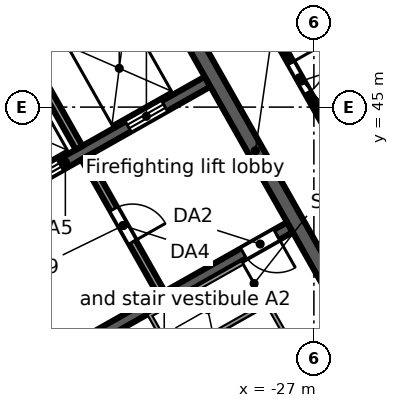
"""IFC4 building model, lengths in metres.
Left out: names, types, materials, properties, quantities, classifications, styles, units other than length and angle.
Written with IfcOpenShell. Run it as: python <this file> out.ifc"""

import sys

from ifc_helpers import new_model, si_unit, direction, frame, frame_2d, origin, place, context, subcontext, project, spatial, rectangle, extrude, element, fill, save


model = new_model("IFC4")
c1 = context("Model", 3, precision=1e-05, world=origin(), true_north=direction((0.0, 1.0)))
c2 = subcontext(c1, "Body", "Model", "MODEL_VIEW")
j1 = project(units=[si_unit("LENGTHUNIT", "METRE"), si_unit("PLANEANGLEUNIT", "RADIAN")], contexts=[c1])
p1 = place(None, origin())
s1 = spatial("IfcSite", under=j1, at=p1, CompositionType="ELEMENT")
p2 = place(p1, origin())
s2 = spatial("IfcBuilding", under=s1, at=p2, CompositionType="ELEMENT")
p3 = place(p2, frame((0.0, 0.0, 274.1)))
s3 = spatial("IfcBuildingStorey", under=s2, at=p3, CompositionType="ELEMENT", Elevation=274.1)
p4 = place(p3, frame((-58.732, 38.771, 0.0), z_axis=(0.0, 0.0, 1.0), x_axis=(0.870355615581, 0.492423702137, 0.0)))
e1 = element("IfcWall", 1, at=p4, inside=s3, PredefinedType="STANDARD", context=c2, shape_type="SweptSolid", body=[
    extrude(rectangle(XDim=64.052, YDim=0.25, at=frame_2d((32.026, 0.0))), origin(), (0.0, 0.0, 1.0), 3.52),
])
p5 = place(p4, frame((61.259, 0.0, 0.8)))
e2 = element("IfcOpeningElement", 2, at=p5, cuts=e1, PredefinedType="OPENING", context=c2, shape_type="SweptSolid", body=[
    extrude(rectangle(XDim=2.4, YDim=2.2, at=frame_2d((1.2, 1.1))), frame((0.0, 0.135, 0.0), z_axis=(0.0, -1.0, 0.0), x_axis=(1.0, 0.0, 0.0)), (0.0, 0.0, 1.0), 0.27),
])
p6 = place(p4, frame((58.216, 0.0, 0.8)))
e3 = element("IfcOpeningElement", 3, at=p6, cuts=e1, PredefinedType="OPENING", context=c2, shape_type="SweptSolid", body=[
    extrude(rectangle(XDim=2.4, YDim=2.2, at=frame_2d((1.2, 1.1))), frame((0.0, 0.135, 0.0), z_axis=(0.0, -1.0, 0.0), x_axis=(1.0, 0.0, 0.0)), (0.0, 0.0, 1.0), 0.27),
])
p7 = place(p4, frame((55.173, 0.0, 0.8)))
e4 = element("IfcOpeningElement", 4, at=p7, cuts=e1, PredefinedType="OPENING", context=c2, shape_type="SweptSolid", body=[
    extrude(rectangle(XDim=2.4, YDim=2.2, at=frame_2d((1.2, 1.1))), frame((0.0, 0.135, 0.0), z_axis=(0.0, -1.0, 0.0), x_axis=(1.0, 0.0, 0.0)), (0.0, 0.0, 1.0), 0.27),
])
p8 = place(p4, frame((52.129, 0.0, 0.8)))
e5 = element("IfcOpeningElement", 5, at=p8, cuts=e1, PredefinedType="OPENING", context=c2, shape_type="SweptSolid", body=[
    extrude(rectangle(XDim=2.4, YDim=2.2, at=frame_2d((1.2, 1.1))), frame((0.0, 0.135, 0.0), z_axis=(0.0, -1.0, 0.0), x_axis=(1.0, 0.0, 0.0)), (0.0, 0.0, 1.0), 0.27),
])
p9 = place(p4, frame((49.086, 0.0, 0.8)))
e6 = element("IfcOpeningElement", 6, at=p9, cuts=e1, PredefinedType="OPENING", context=c2, shape_type="SweptSolid", body=[
    extrude(rectangle(XDim=2.4, YDim=2.2, at=frame_2d((1.2, 1.1))), frame((0.0, 0.135, 0.0), z_axis=(0.0, -1.0, 0.0), x_axis=(1.0, 0.0, 0.0)), (0.0, 0.0, 1.0), 0.27),
])
p10 = place(p4, frame((46.043, 0.0, 0.8)))
e7 = element("IfcOpeningElement", 7, at=p10, cuts=e1, PredefinedType="OPENING", context=c2, shape_type="SweptSolid", body=[
    extrude(rectangle(XDim=2.4, YDim=2.2, at=frame_2d((1.2, 1.1))), frame((0.0, 0.135, 0.0), z_axis=(0.0, -1.0, 0.0), x_axis=(1.0, 0.0, 0.0)), (0.0, 0.0, 1.0), 0.27),
])
p11 = place(p4, frame((43.0, 0.0, 0.8)))
e8 = element("IfcOpeningElement", 8, at=p11, cuts=e1, PredefinedType="OPENING", context=c2, shape_type="SweptSolid", body=[
    extrude(rectangle(XDim=2.4, YDim=2.2, at=frame_2d((1.2, 1.1))), frame((0.0, 0.135, 0.0), z_axis=(0.0, -1.0, 0.0), x_axis=(1.0, 0.0, 0.0)), (0.0, 0.0, 1.0), 0.27),
])
p12 = place(p4, frame((39.956, 0.0, 0.8)))
e9 = element("IfcOpeningElement", 9, at=p12, cuts=e1, PredefinedType="OPENING", context=c2, shape_type="SweptSolid", body=[
    extrude(rectangle(XDim=2.4, YDim=2.2, at=frame_2d((1.2, 1.1))), frame((0.0, 0.135, 0.0), z_axis=(0.0, -1.0, 0.0), x_axis=(1.0, 0.0, 0.0)), (0.0, 0.0, 1.0), 0.27),
])
p13 = place(p4, frame((36.913, 0.0, 0.8)))
e10 = element("IfcOpeningElement", 10, at=p13, cuts=e1, PredefinedType="OPENING", context=c2, shape_type="SweptSolid", body=[
    extrude(rectangle(XDim=2.4, YDim=2.2, at=frame_2d((1.2, 1.1))), frame((0.0, 0.135, 0.0), z_axis=(0.0, -1.0, 0.0), x_axis=(1.0, 0.0, 0.0)), (0.0, 0.0, 1.0), 0.27),
])
p14 = place(p4, frame((33.87, 0.0, 0.8)))
e11 = element("IfcOpeningElement", 11, at=p14, cuts=e1, PredefinedType="OPENING", context=c2, shape_type="SweptSolid", body=[
    extrude(rectangle(XDim=2.4, YDim=2.2, at=frame_2d((1.2, 1.1))), frame((0.0, 0.135, 0.0), z_axis=(0.0, -1.0, 0.0), x_axis=(1.0, 0.0, 0.0)), (0.0, 0.0, 1.0), 0.27),
])
p15 = place(p4, frame((30.826, 0.0, 0.8)))
e12 = element("IfcOpeningElement", 12, at=p15, cuts=e1, PredefinedType="OPENING", context=c2, shape_type="SweptSolid", body=[
    extrude(rectangle(XDim=2.4, YDim=2.2, at=frame_2d((1.2, 1.1))), frame((0.0, 0.135, 0.0), z_axis=(0.0, -1.0, 0.0), x_axis=(1.0, 0.0, 0.0)), (0.0, 0.0, 1.0), 0.27),
])
p16 = place(p4, frame((27.783, 0.0, 0.8)))
e13 = element("IfcOpeningElement", 13, at=p16, cuts=e1, PredefinedType="OPENING", context=c2, shape_type="SweptSolid", body=[
    extrude(rectangle(XDim=2.4, YDim=2.2, at=frame_2d((1.2, 1.1))), frame((0.0, 0.135, 0.0), z_axis=(0.0, -1.0, 0.0), x_axis=(1.0, 0.0, 0.0)), (0.0, 0.0, 1.0), 0.27),
])
p17 = place(p4, frame((24.74, 0.0, 0.8)))
e14 = element("IfcOpeningElement", 14, at=p17, cuts=e1, PredefinedType="OPENING", context=c2, shape_type="SweptSolid", body=[
    extrude(rectangle(XDim=2.4, YDim=2.2, at=frame_2d((1.2, 1.1))), frame((0.0, 0.135, 0.0), z_axis=(0.0, -1.0, 0.0), x_axis=(1.0, 0.0, 0.0)), (0.0, 0.0, 1.0), 0.27),
])
p18 = place(p4, frame((21.696, 0.0, 0.8)))
e15 = element("IfcOpeningElement", 15, at=p18, cuts=e1, PredefinedType="OPENING", context=c2, shape_type="SweptSolid", body=[
    extrude(rectangle(XDim=2.4, YDim=2.2, at=frame_2d((1.2, 1.1))), frame((0.0, 0.135, 0.0), z_axis=(0.0, -1.0, 0.0), x_axis=(1.0, 0.0, 0.0)), (0.0, 0.0, 1.0), 0.27),
])
p19 = place(p4, frame((18.653, 0.0, 0.8)))
e16 = element("IfcOpeningElement", 16, at=p19, cuts=e1, PredefinedType="OPENING", context=c2, shape_type="SweptSolid", body=[
    extrude(rectangle(XDim=2.4, YDim=2.2, at=frame_2d((1.2, 1.1))), frame((0.0, 0.135, 0.0), z_axis=(0.0, -1.0, 0.0), x_axis=(1.0, 0.0, 0.0)), (0.0, 0.0, 1.0), 0.27),
])
p20 = place(p4, frame((15.61, 0.0, 0.8)))
e17 = element("IfcOpeningElement", 17, at=p20, cuts=e1, PredefinedType="OPENING", context=c2, shape_type="SweptSolid", body=[
    extrude(rectangle(XDim=2.4, YDim=2.2, at=frame_2d((1.2, 1.1))), frame((0.0, 0.135, 0.0), z_axis=(0.0, -1.0, 0.0), x_axis=(1.0, 0.0, 0.0)), (0.0, 0.0, 1.0), 0.27),
])
p21 = place(p4, frame((12.567, 0.0, 0.8)))
e18 = element("IfcOpeningElement", 18, at=p21, cuts=e1, PredefinedType="OPENING", context=c2, shape_type="SweptSolid", body=[
    extrude(rectangle(XDim=2.4, YDim=2.2, at=frame_2d((1.2, 1.1))), frame((0.0, 0.135, 0.0), z_axis=(0.0, -1.0, 0.0), x_axis=(1.0, 0.0, 0.0)), (0.0, 0.0, 1.0), 0.27),
])
p22 = place(p4, frame((9.523, 0.0, 0.8)))
e19 = element("IfcOpeningElement", 19, at=p22, cuts=e1, PredefinedType="OPENING", context=c2, shape_type="SweptSolid", body=[
    extrude(rectangle(XDim=2.4, YDim=2.2, at=frame_2d((1.2, 1.1))), frame((0.0, 0.135, 0.0), z_axis=(0.0, -1.0, 0.0), x_axis=(1.0, 0.0, 0.0)), (0.0, 0.0, 1.0), 0.27),
])
p23 = place(p4, frame((6.48, 0.0, 0.8)))
e20 = element("IfcOpeningElement", 20, at=p23, cuts=e1, PredefinedType="OPENING", context=c2, shape_type="SweptSolid", body=[
    extrude(rectangle(XDim=2.4, YDim=2.2, at=frame_2d((1.2, 1.1))), frame((0.0, 0.135, 0.0), z_axis=(0.0, -1.0, 0.0), x_axis=(1.0, 0.0, 0.0)), (0.0, 0.0, 1.0), 0.27),
])
p24 = place(p4, frame((3.437, 0.0, 0.8)))
e21 = element("IfcOpeningElement", 21, at=p24, cuts=e1, PredefinedType="OPENING", context=c2, shape_type="SweptSolid", body=[
    extrude(rectangle(XDim=2.4, YDim=2.2, at=frame_2d((1.2, 1.1))), frame((0.0, 0.135, 0.0), z_axis=(0.0, -1.0, 0.0), x_axis=(1.0, 0.0, 0.0)), (0.0, 0.0, 1.0), 0.27),
])
p25 = place(p4, frame((0.393, 0.0, 0.8)))
e22 = element("IfcOpeningElement", 22, at=p25, cuts=e1, PredefinedType="OPENING", context=c2, shape_type="SweptSolid", body=[
    extrude(rectangle(XDim=2.4, YDim=2.2, at=frame_2d((1.2, 1.1))), frame((0.0, 0.135, 0.0), z_axis=(0.0, -1.0, 0.0), x_axis=(1.0, 0.0, 0.0)), (0.0, 0.0, 1.0), 0.27),
])
p26 = place(p3, frame((-3.017, 46.293, 0.0), z_axis=(0.0, 0.0, 1.0), x_axis=(-0.870355474887, -0.492423950812, 0.0)))
e23 = element("IfcWall", 23, at=p26, inside=s3, PredefinedType="STANDARD", context=c2, shape_type="SweptSolid", body=[
    extrude(rectangle(XDim=40.34, YDim=0.25, at=frame_2d((20.17, 0.0))), origin(), (0.0, 0.0, 1.0), 3.52),
])
p27 = place(p26, frame((37.428, 0.0, 0.8)))
e24 = element("IfcOpeningElement", 24, at=p27, cuts=e23, PredefinedType="OPENING", context=c2, shape_type="SweptSolid", body=[
    extrude(rectangle(XDim=2.4, YDim=2.2, at=frame_2d((1.2, 1.1))), frame((0.0, 0.135, 0.0), z_axis=(0.0, -1.0, 0.0), x_axis=(1.0, 0.0, 0.0)), (0.0, 0.0, 1.0), 0.27),
])
p28 = place(p26, frame((34.372, 0.0, 0.0)))
e25 = element("IfcOpeningElement", 25, at=p28, cuts=e23, PredefinedType="OPENING", context=c2, shape_type="SweptSolid", body=[
    extrude(rectangle(XDim=1.8, YDim=2.4, at=frame_2d((0.9, 1.2))), frame((0.0, 0.135, 0.0), z_axis=(0.0, -1.0, 0.0), x_axis=(1.0, 0.0, 0.0)), (0.0, 0.0, 1.0), 0.27),
])
p29 = place(p26, frame((30.716, 0.0, 0.8)))
e26 = element("IfcOpeningElement", 26, at=p29, cuts=e23, PredefinedType="OPENING", context=c2, shape_type="SweptSolid", body=[
    extrude(rectangle(XDim=2.4, YDim=2.2, at=frame_2d((1.2, 1.1))), frame((0.0, 0.135, 0.0), z_axis=(0.0, -1.0, 0.0), x_axis=(1.0, 0.0, 0.0)), (0.0, 0.0, 1.0), 0.27),
])
p30 = place(p26, frame((27.36, 0.0, 0.8)))
e27 = element("IfcOpeningElement", 27, at=p30, cuts=e23, PredefinedType="OPENING", context=c2, shape_type="SweptSolid", body=[
    extrude(rectangle(XDim=2.4, YDim=2.2, at=frame_2d((1.2, 1.1))), frame((0.0, 0.135, 0.0), z_axis=(0.0, -1.0, 0.0), x_axis=(1.0, 0.0, 0.0)), (0.0, 0.0, 1.0), 0.27),
])
p31 = place(p26, frame((24.304, 0.0, 0.0)))
e28 = element("IfcOpeningElement", 28, at=p31, cuts=e23, PredefinedType="OPENING", context=c2, shape_type="SweptSolid", body=[
    extrude(rectangle(XDim=1.8, YDim=2.4, at=frame_2d((0.9, 1.2))), frame((0.0, 0.135, 0.0), z_axis=(0.0, -1.0, 0.0), x_axis=(1.0, 0.0, 0.0)), (0.0, 0.0, 1.0), 0.27),
])
p32 = place(p26, frame((20.648, 0.0, 0.8)))
e29 = element("IfcOpeningElement", 29, at=p32, cuts=e23, PredefinedType="OPENING", context=c2, shape_type="SweptSolid", body=[
    extrude(rectangle(XDim=2.4, YDim=2.2, at=frame_2d((1.2, 1.1))), frame((0.0, 0.135, 0.0), z_axis=(0.0, -1.0, 0.0), x_axis=(1.0, 0.0, 0.0)), (0.0, 0.0, 1.0), 0.27),
])
p33 = place(p26, frame((17.292, 0.0, 0.8)))
e30 = element("IfcOpeningElement", 30, at=p33, cuts=e23, PredefinedType="OPENING", context=c2, shape_type="SweptSolid", body=[
    extrude(rectangle(XDim=2.4, YDim=2.2, at=frame_2d((1.2, 1.1))), frame((0.0, 0.135, 0.0), z_axis=(0.0, -1.0, 0.0), x_axis=(1.0, 0.0, 0.0)), (0.0, 0.0, 1.0), 0.27),
])
p34 = place(p26, frame((14.236, 0.0, 0.0)))
e31 = element("IfcOpeningElement", 31, at=p34, cuts=e23, PredefinedType="OPENING", context=c2, shape_type="SweptSolid", body=[
    extrude(rectangle(XDim=1.8, YDim=2.4, at=frame_2d((0.9, 1.2))), frame((0.0, 0.135, 0.0), z_axis=(0.0, -1.0, 0.0), x_axis=(1.0, 0.0, 0.0)), (0.0, 0.0, 1.0), 0.27),
])
p35 = place(p26, frame((10.58, 0.0, 0.8)))
e32 = element("IfcOpeningElement", 32, at=p35, cuts=e23, PredefinedType="OPENING", context=c2, shape_type="SweptSolid", body=[
    extrude(rectangle(XDim=2.4, YDim=2.2, at=frame_2d((1.2, 1.1))), frame((0.0, 0.135, 0.0), z_axis=(0.0, -1.0, 0.0), x_axis=(1.0, 0.0, 0.0)), (0.0, 0.0, 1.0), 0.27),
])
p36 = place(p26, frame((7.224, 0.0, 0.8)))
e33 = element("IfcOpeningElement", 33, at=p36, cuts=e23, PredefinedType="OPENING", context=c2, shape_type="SweptSolid", body=[
    extrude(rectangle(XDim=2.4, YDim=2.2, at=frame_2d((1.2, 1.1))), frame((0.0, 0.135, 0.0), z_axis=(0.0, -1.0, 0.0), x_axis=(1.0, 0.0, 0.0)), (0.0, 0.0, 1.0), 0.27),
])
p37 = place(p26, frame((4.168, 0.0, 0.0)))
e34 = element("IfcOpeningElement", 34, at=p37, cuts=e23, PredefinedType="OPENING", context=c2, shape_type="SweptSolid", body=[
    extrude(rectangle(XDim=1.8, YDim=2.4, at=frame_2d((0.9, 1.2))), frame((0.0, 0.135, 0.0), z_axis=(0.0, -1.0, 0.0), x_axis=(1.0, 0.0, 0.0)), (0.0, 0.0, 1.0), 0.27),
])
p38 = place(p26, frame((0.512, 0.0, 0.8)))
e35 = element("IfcOpeningElement", 35, at=p38, cuts=e23, PredefinedType="OPENING", context=c2, shape_type="SweptSolid", body=[
    extrude(rectangle(XDim=2.4, YDim=2.2, at=frame_2d((1.2, 1.1))), frame((0.0, 0.135, 0.0), z_axis=(0.0, -1.0, 0.0), x_axis=(1.0, 0.0, 0.0)), (0.0, 0.0, 1.0), 0.27),
])
p39 = place(p3, frame((-34.245, 38.097, 0.0), z_axis=(0.0, 0.0, 1.0), x_axis=(0.870356351998, 0.492422400523, 0.0)))
e36 = element("IfcWall", 36, at=p39, inside=s3, PredefinedType="SOLIDWALL", context=c2, shape_type="SweptSolid", body=[
    extrude(rectangle(XDim=7.6, YDim=0.3, at=frame_2d((3.8, 0.0))), origin(), (0.0, 0.0, 1.0), 3.52),
])
p40 = place(p39, frame((6.2, 0.0, 0.0)))
e37 = element("IfcOpeningElement", 37, at=p40, cuts=e36, PredefinedType="OPENING", context=c2, shape_type="SweptSolid", body=[
    extrude(rectangle(XDim=1.0, YDim=2.1, at=frame_2d((0.5, 1.05))), frame((0.0, 0.16, 0.0), z_axis=(0.0, -1.0, 0.0), x_axis=(1.0, 0.0, 0.0)), (0.0, 0.0, 1.0), 0.32),
])
p41 = place(p3, frame((-37.282, 41.435, 0.0), z_axis=(0.0, 0.0, 1.0), x_axis=(0.870361315115, 0.492413628113, 0.0)))
e38 = element("IfcWall", 38, at=p41, inside=s3, PredefinedType="SOLIDWALL", context=c2, shape_type="SweptSolid", body=[
    extrude(rectangle(XDim=8.6, YDim=0.3, at=frame_2d((4.3, 0.0))), origin(), (0.0, 0.0, 1.0), 3.52),
])
p42 = place(p41, frame((0.65, 0.0, 0.0)))
e39 = element("IfcOpeningElement", 39, at=p42, cuts=e38, PredefinedType="OPENING", context=c2, shape_type="SweptSolid", body=[
    extrude(rectangle(XDim=1.1, YDim=2.1, at=frame_2d((0.55, 1.05))), frame((0.0, 0.16, 0.0), z_axis=(0.0, -1.0, 0.0), x_axis=(1.0, 0.0, 0.0)), (0.0, 0.0, 1.0), 0.32),
])
p43 = place(p41, frame((3.05, 0.0, 0.0)))
e40 = element("IfcOpeningElement", 40, at=p43, cuts=e38, PredefinedType="OPENING", context=c2, shape_type="SweptSolid", body=[
    extrude(rectangle(XDim=1.1, YDim=2.1, at=frame_2d((0.55, 1.05))), frame((0.0, 0.16, 0.0), z_axis=(0.0, -1.0, 0.0), x_axis=(1.0, 0.0, 0.0)), (0.0, 0.0, 1.0), 0.32),
])
p44 = place(p41, frame((6.2, 0.0, 0.0)))
e41 = element("IfcOpeningElement", 41, at=p44, cuts=e38, PredefinedType="OPENING", context=c2, shape_type="SweptSolid", body=[
    extrude(rectangle(XDim=1.1, YDim=2.1, at=frame_2d((0.55, 1.05))), frame((0.0, 0.16, 0.0), z_axis=(0.0, -1.0, 0.0), x_axis=(1.0, 0.0, 0.0)), (0.0, 0.0, 1.0), 0.32),
])
p45 = place(p3, frame((-46.51, 41.499, 0.0), z_axis=(0.0, 0.0, 1.0), x_axis=(0.870356271124, 0.492422543467, 0.0)))
e42 = element("IfcWall", 42, at=p45, inside=s3, PredefinedType="SOLIDWALL", context=c2, shape_type="SweptSolid", body=[
    extrude(rectangle(XDim=17.0, YDim=0.4, at=frame_2d((8.5, 0.0))), origin(), (0.0, 0.0, 1.0), 3.52),
])
p46 = place(p3, frame((-33.031, 43.667, 0.0), z_axis=(0.0, 0.0, 1.0), x_axis=(0.492408451753, -0.87036424366, 0.0)))
e43 = element("IfcWall", 43, at=p46, inside=s3, PredefinedType="PARTITIONING", context=c2, shape_type="SweptSolid", body=[
    extrude(rectangle(XDim=4.1, YDim=0.2, at=frame_2d((2.05, 0.0))), origin(), (0.0, 0.0, 1.0), 3.52),
])
p47 = place(p46, frame((1.55, 0.0, 0.0)))
e44 = element("IfcOpeningElement", 44, at=p47, cuts=e43, PredefinedType="OPENING", context=c2, shape_type="SweptSolid", body=[
    extrude(rectangle(XDim=1.0, YDim=2.1, at=frame_2d((0.5, 1.05))), frame((0.0, 0.11, 0.0), z_axis=(0.0, -1.0, 0.0), x_axis=(1.0, 0.0, 0.0)), (0.0, 0.0, 1.0), 0.22),
])
p48 = place(p3, frame((-35.271, 47.628, 0.0), z_axis=(0.0, 0.0, 1.0), x_axis=(0.492422543467, -0.870356271124, 0.0)))
e45 = element("IfcWall", 45, at=p48, inside=s3, PredefinedType="SOLIDWALL", context=c2, shape_type="SweptSolid", body=[
    extrude(rectangle(XDim=4.25, YDim=0.2, at=frame_2d((2.125, 0.0))), origin(), (0.0, 0.0, 1.0), 3.52),
])
p49 = place(p3, frame((-31.79, 49.597, 0.0), z_axis=(0.0, 0.0, 1.0), x_axis=(0.492421663121, -0.870356769198, 0.0)))
e46 = element("IfcWall", 46, at=p49, inside=s3, PredefinedType="SOLIDWALL", context=c2, shape_type="SweptSolid", body=[
    extrude(rectangle(XDim=13.2, YDim=0.4, at=frame_2d((6.6, 0.0))), origin(), (0.0, 0.0, 1.0), 3.52),
])
p50 = place(p3, frame((-27.827, 46.554, 0.0), z_axis=(0.0, 0.0, 1.0), x_axis=(0.492374954878, -0.870383193662, 0.0)))
e47 = element("IfcWall", 47, at=p50, inside=s3, PredefinedType="PARTITIONING", context=c2, shape_type="SweptSolid", body=[
    extrude(rectangle(XDim=2.0, YDim=0.15, at=frame_2d((1.0, 0.0))), origin(), (0.0, 0.0, 1.0), 2.792),
])
p51 = place(p50, frame((0.45, 0.0, 0.0)))
e48 = element("IfcOpeningElement", 48, at=p51, cuts=e47, PredefinedType="OPENING", context=c2, shape_type="SweptSolid", body=[
    extrude(rectangle(XDim=0.9, YDim=2.1, at=frame_2d((0.45, 1.05))), frame((0.0, 0.085, 0.0), z_axis=(0.0, -1.0, 0.0), x_axis=(1.0, 0.0, 0.0)), (0.0, 0.0, 1.0), 0.17),
])
p52 = place(p3, frame((-26.842, 44.813, 0.0), z_axis=(0.0, 0.0, 1.0), x_axis=(0.492365617434, -0.870388475779, 0.0)))
e49 = element("IfcWall", 49, at=p52, inside=s3, PredefinedType="PARTITIONING", context=c2, shape_type="SweptSolid", body=[
    extrude(rectangle(XDim=3.0, YDim=0.15, at=frame_2d((1.5, 0.0))), origin(), (0.0, 0.0, 1.0), 2.792),
])
p53 = place(p52, frame((0.95, 0.0, 0.0)))
e50 = element("IfcOpeningElement", 50, at=p53, cuts=e49, PredefinedType="OPENING", context=c2, shape_type="SweptSolid", body=[
    extrude(rectangle(XDim=0.9, YDim=2.1, at=frame_2d((0.45, 1.05))), frame((0.0, 0.085, 0.0), z_axis=(0.0, -1.0, 0.0), x_axis=(1.0, 0.0, 0.0)), (0.0, 0.0, 1.0), 0.17),
])
p54 = place(p43, origin())
e51 = element("IfcDoor", 51, at=p54, inside=s3, OperationType="DOUBLE_DOOR_SLIDING", PredefinedType="DOOR", context=c2, shape_type="SweptSolid", body=[
    extrude(rectangle(XDim=1.1, YDim=2.1, at=frame_2d((0.55, 1.05))), frame((0.0, 0.025, 0.0), z_axis=(0.0, -1.0, 0.0), x_axis=(1.0, 0.0, 0.0)), (0.0, 0.0, 1.0), 0.05),
])
fill(e40, e51)
p55 = place(p44, origin())
e52 = element("IfcDoor", 52, at=p55, inside=s3, OperationType="DOUBLE_DOOR_SLIDING", PredefinedType="DOOR", context=c2, shape_type="SweptSolid", body=[
    extrude(rectangle(XDim=1.1, YDim=2.1, at=frame_2d((0.55, 1.05))), frame((0.0, 0.025, 0.0), z_axis=(0.0, -1.0, 0.0), x_axis=(1.0, 0.0, 0.0)), (0.0, 0.0, 1.0), 0.05),
])
fill(e41, e52)
p56 = place(p40, frame((1.0, 0.0, 0.0), z_axis=(0.0, 0.0, 1.0), x_axis=(-1.0, 0.0, 0.0)))
e53 = element("IfcDoor", 53, at=p56, inside=s3, OperationType="SINGLE_SWING_LEFT", PredefinedType="DOOR", context=c2, shape_type="SweptSolid", body=[
    extrude(rectangle(XDim=1.0, YDim=2.1, at=frame_2d((0.5, 1.05))), frame((0.0, 0.025, 0.0), z_axis=(0.0, -1.0, 0.0), x_axis=(1.0, 0.0, 0.0)), (0.0, 0.0, 1.0), 0.05),
])
fill(e37, e53)
p57 = place(p47, origin())
e54 = element("IfcDoor", 54, at=p57, inside=s3, OperationType="SINGLE_SWING_RIGHT", PredefinedType="DOOR", context=c2, shape_type="SweptSolid", body=[
    extrude(rectangle(XDim=1.0, YDim=2.1, at=frame_2d((0.5, 1.05))), frame((0.0, 0.025, 0.0), z_axis=(0.0, -1.0, 0.0), x_axis=(1.0, 0.0, 0.0)), (0.0, 0.0, 1.0), 0.05),
])
fill(e44, e54)
p58 = place(p51, origin())
e55 = element("IfcDoor", 55, at=p58, inside=s3, OperationType="SINGLE_SWING_LEFT", PredefinedType="DOOR", context=c2, shape_type="SweptSolid", body=[
    extrude(rectangle(XDim=0.9, YDim=2.1, at=frame_2d((0.45, 1.05))), frame((0.0, 0.025, 0.0), z_axis=(0.0, -1.0, 0.0), x_axis=(1.0, 0.0, 0.0)), (0.0, 0.0, 1.0), 0.05),
])
fill(e48, e55)
save(model, sys.argv[1])
